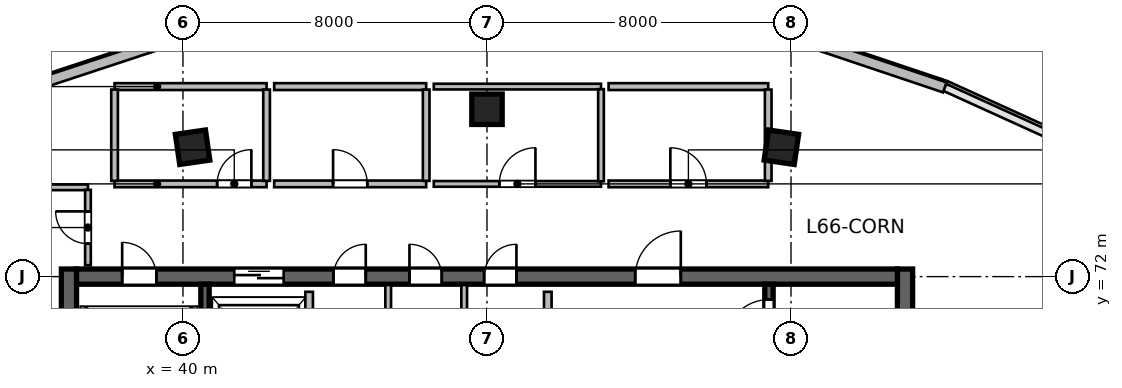
"""IFC4 building model, lengths in metres.
Left out: names, types, materials, properties, quantities, classifications, styles, units other than length and angle.
Written with IfcOpenShell. Run it as: python <this file> out.ifc"""

import sys

from ifc_helpers import new_model, si_unit, direction, frame, frame_2d, origin, origin_2d, place, context, subcontext, project, spatial, rectangle, extrude, source, transform, mapped, element, fill, save


model = new_model("IFC4")
c1 = context("Model", 3, precision=1e-05, world=origin(), true_north=direction((0.0, 1.0)))
c2 = subcontext(c1, "Body", "Model", "MODEL_VIEW")
j1 = project(units=[si_unit("LENGTHUNIT", "METRE"), si_unit("PLANEANGLEUNIT", "RADIAN")], contexts=[c1])
p1 = place(None, origin())
s1 = spatial("IfcSite", under=j1, at=p1, CompositionType="ELEMENT")
p2 = place(p1, origin())
s2 = spatial("IfcBuilding", under=s1, at=p2, CompositionType="ELEMENT")
p3 = place(p2, frame((0.0, 0.0, 271.8)))
s3 = spatial("IfcBuildingStorey", under=s2, at=p3, CompositionType="ELEMENT", Elevation=271.8)
m1 = source(origin(), c2, "Body", "SweptSolid", [
    extrude(rectangle(XDim=12.0, YDim=0.4, at=frame_2d((6.0, 0.0))), origin(), (0.0, 0.0, 1.0), 3.9),
])
for number, where, z_axis, x_axis in (
    (1, (37.0, 60.2, 0.0), (0.0, 0.0, 1.0), (0.0, 1.0, 0.0)),
    (2, (59.0, 60.2, 0.0), (0.0, 0.0, 1.0), (0.0, 1.0, 0.0)),
):
    element("IfcWall", number, at=place(p3, frame(where, z_axis=z_axis, x_axis=x_axis)), inside=s3, PredefinedType="SHEAR", context=c2, shape_type="MappedRepresentation", body=[
        mapped(m1, transform((0.0, 0.0, 0.0), scale=1.0)),
    ])
m2 = source(origin(), c2, "Body", "SweptSolid", [
    extrude(rectangle(XDim=21.6, YDim=0.4, at=frame_2d((10.8, 0.0))), origin(), (0.0, 0.0, 1.0), 3.9),
])
p4 = place(p3, frame((37.2, 72.0, 0.0), z_axis=(0.0, 0.0, 1.0), x_axis=(1.0, 0.0, 0.0)))
e3 = element("IfcWall", 3, at=p4, inside=s3, PredefinedType="SHEAR", context=c2, shape_type="MappedRepresentation", body=[
    mapped(m2, transform((0.0, 0.0, 0.0), scale=1.0)),
])
p5 = place(p4, frame((1.2, 0.0, 0.0)))
e4 = element("IfcOpeningElement", 4, at=p5, cuts=e3, PredefinedType="OPENING", context=c2, shape_type="SweptSolid", body=[
    extrude(rectangle(XDim=0.9, YDim=2.1, at=frame_2d((0.45, 1.05))), frame((0.0, 0.21, 0.0), z_axis=(0.0, -1.0, 0.0), x_axis=(1.0, 0.0, 0.0)), (0.0, 0.0, 1.0), 0.42),
])
p6 = place(p4, frame((14.7, 0.0, 0.0)))
e5 = element("IfcOpeningElement", 5, at=p6, cuts=e3, PredefinedType="OPENING", context=c2, shape_type="SweptSolid", body=[
    extrude(rectangle(XDim=1.2, YDim=2.15, at=frame_2d((0.6, 1.075))), frame((0.0, 0.21, 0.0), z_axis=(0.0, -1.0, 0.0), x_axis=(1.0, 0.0, 0.0)), (0.0, 0.0, 1.0), 0.42),
])
p7 = place(p4, frame((4.15, 0.0, 0.0)))
e6 = element("IfcOpeningElement", 6, at=p7, cuts=e3, PredefinedType="OPENING", context=c2, shape_type="SweptSolid", body=[
    extrude(rectangle(XDim=1.3, YDim=2.15, at=frame_2d((0.65, 1.075))), frame((0.0, 0.21, 0.0), z_axis=(0.0, -1.0, 0.0), x_axis=(1.0, 0.0, 0.0)), (0.0, 0.0, 1.0), 0.42),
])
p8 = place(p4, frame((6.76, 0.0, 0.0)))
e7 = element("IfcOpeningElement", 7, at=p8, cuts=e3, PredefinedType="OPENING", context=c2, shape_type="SweptSolid", body=[
    extrude(rectangle(XDim=0.85, YDim=2.1, at=frame_2d((0.425, 1.05))), frame((0.0, 0.21, 0.0), z_axis=(0.0, -1.0, 0.0), x_axis=(1.0, 0.0, 0.0)), (0.0, 0.0, 1.0), 0.42),
])
p9 = place(p4, frame((8.76, 0.0, 0.0)))
e8 = element("IfcOpeningElement", 8, at=p9, cuts=e3, PredefinedType="OPENING", context=c2, shape_type="SweptSolid", body=[
    extrude(rectangle(XDim=0.85, YDim=2.1, at=frame_2d((0.425, 1.05))), frame((0.0, 0.21, 0.0), z_axis=(0.0, -1.0, 0.0), x_axis=(1.0, 0.0, 0.0)), (0.0, 0.0, 1.0), 0.42),
])
p10 = place(p4, frame((10.725, 0.0, 0.0)))
e9 = element("IfcOpeningElement", 9, at=p10, cuts=e3, PredefinedType="OPENING", context=c2, shape_type="SweptSolid", body=[
    extrude(rectangle(XDim=0.85, YDim=2.1, at=frame_2d((0.425, 1.05))), frame((0.0, 0.21, 0.0), z_axis=(0.0, -1.0, 0.0), x_axis=(1.0, 0.0, 0.0)), (0.0, 0.0, 1.0), 0.42),
])
m3 = source(origin(), c2, "Body", "SweptSolid", [
    extrude(rectangle(XDim=11.2, YDim=0.22, at=frame_2d((5.6, 0.0))), origin(), (0.0, 0.0, 1.0), 3.9),
])
p11 = place(p3, frame((40.58, 60.6, 0.0), z_axis=(0.0, 0.0, 1.0), x_axis=(0.0, 1.0, 0.0)))
e10 = element("IfcWall", 10, at=p11, inside=s3, PredefinedType="SHEAR", context=c2, shape_type="MappedRepresentation", body=[
    mapped(m3, transform((0.0, 0.0, 0.0), scale=1.0)),
])
p12 = place(p3, frame((55.42, 60.6, 0.0), z_axis=(0.0, 0.0, 1.0), x_axis=(0.0, 1.0, 0.0)))
e11 = element("IfcWall", 11, at=p12, inside=s3, PredefinedType="SHEAR", context=c2, shape_type="MappedRepresentation", body=[
    mapped(m3, transform((0.0, 0.0, 0.0), scale=1.0)),
])
p13 = place(p12, frame((9.645, 0.0, 0.0)))
e12 = element("IfcOpeningElement", 12, at=p13, cuts=e11, PredefinedType="OPENING", context=c2, shape_type="SweptSolid", body=[
    extrude(rectangle(XDim=1.15, YDim=2.15, at=frame_2d((0.575, 1.075))), frame((0.0, 0.12, 0.0), z_axis=(0.0, -1.0, 0.0), x_axis=(1.0, 0.0, 0.0)), (0.0, 0.0, 1.0), 0.24),
])
m4 = source(origin(), c2, "Body", "SweptSolid", [
    extrude(rectangle(XDim=0.8, YDim=0.8, at=origin_2d()), origin(), (0.0, 0.0, 1.0), 3.9),
])
for number, where, z_axis, x_axis in (
    (13, (40.253, 75.404, 0.0), (0.0, 0.0, 1.0), (-0.143, 0.99, 0.0)),
    (14, (48.0, 76.404, 0.0), (0.0, 0.0, 1.0), (0.0, 1.0, 0.0)),
    (15, (55.747, 75.404, 0.0), (0.0, 0.0, 1.0), (0.143, 0.99, 0.0)),
):
    element("IfcColumn", number, at=place(p3, frame(where, z_axis=z_axis, x_axis=x_axis)), inside=s3, PredefinedType="COLUMN", context=c2, shape_type="MappedRepresentation", body=[
        mapped(m4, transform((0.0, 0.0, 0.0), scale=1.0)),
    ])
m5 = source(origin(), c2, "Body", "SweptSolid", [
    extrude(rectangle(XDim=3.54, YDim=0.28, at=frame_2d((1.77, 0.0))), origin(), (0.0, 0.0, 1.0), 3.64),
])
p14 = place(p3, frame((36.132, 77.049, 0.0), z_axis=(0.0, 0.0, 1.0), x_axis=(0.949678507031, 0.313226329165, 0.0)))
e16 = element("IfcWall", 16, at=p14, inside=s3, PredefinedType="SOLIDWALL", context=c2, shape_type="MappedRepresentation", body=[
    mapped(m5, transform((0.0, 0.0, 0.0), scale=1.0)),
])
m6 = source(origin(), c2, "Body", "SweptSolid", [
    extrude(rectangle(XDim=3.543, YDim=0.28, at=frame_2d((1.771, 0.0))), origin(), (0.0, 0.0, 1.0), 3.64),
])
p15 = place(p3, frame((56.688, 78.108, 0.0), z_axis=(0.0, 0.0, 1.0), x_axis=(0.947922565312, -0.318500879389, 0.0)))
e17 = element("IfcWall", 17, at=p15, inside=s3, PredefinedType="SOLIDWALL", context=c2, shape_type="MappedRepresentation", body=[
    mapped(m6, transform((0.0, 0.0, 0.0), scale=1.0)),
])
m7 = source(origin(), c2, "Body", "SweptSolid", [
    extrude(rectangle(XDim=5.8, YDim=0.2, at=frame_2d((2.9, 0.0))), origin(), (0.0, 0.0, 1.0), 3.64),
])
p16 = place(p3, frame((49.6, 65.8, 0.0), z_axis=(0.0, 0.0, 1.0), x_axis=(0.0, 1.0, 0.0)))
e18 = element("IfcWall", 18, at=p16, inside=s3, PredefinedType="SOLIDWALL", context=c2, shape_type="MappedRepresentation", body=[
    mapped(m7, transform((0.0, 0.0, 0.0), scale=1.0)),
])
m8 = source(origin(), c2, "Body", "SweptSolid", [
    extrude(rectangle(XDim=3.2, YDim=0.2, at=frame_2d((1.6, 0.0))), origin(), (0.0, 0.0, 1.0), 3.64),
])
p17 = place(p3, frame((43.32, 68.4, 0.0), z_axis=(0.0, 0.0, 1.0), x_axis=(0.0, 1.0, 0.0)))
e19 = element("IfcWall", 19, at=p17, inside=s3, PredefinedType="SOLIDWALL", context=c2, shape_type="MappedRepresentation", body=[
    mapped(m8, transform((0.0, 0.0, 0.0), scale=1.0)),
])
m9 = source(origin(), c2, "Body", "SweptSolid", [
    extrude(rectangle(XDim=3.38, YDim=0.15, at=frame_2d((1.69, 0.0))), origin(), (0.0, 0.0, 1.0), 3.64),
])
for number, where, z_axis, x_axis in (
    (20, (45.4, 68.4, 0.0), (0.0, 0.0, 1.0), (0.0, 1.0, 0.0)),
    (21, (47.4, 68.4, 0.0), (0.0, 0.0, 1.0), (0.0, 1.0, 0.0)),
):
    element("IfcWall", number, at=place(p3, frame(where, z_axis=z_axis, x_axis=x_axis)), inside=s3, PredefinedType="PARTITIONING", context=c2, shape_type="MappedRepresentation", body=[
        mapped(m9, transform((0.0, 0.0, 0.0), scale=1.0)),
    ])
m10 = source(origin(), c2, "Body", "SweptSolid", [
    extrude(rectangle(XDim=3.1, YDim=0.15, at=frame_2d((1.55, 0.0))), origin(), (0.0, 0.0, 1.0), 3.071),
])
p18 = place(p3, frame((34.4, 74.35, 0.0), z_axis=(0.0, 0.0, 1.0), x_axis=(1.0, 0.0, 0.0)))
e22 = element("IfcWall", 22, at=p18, inside=s3, PredefinedType="PARTITIONING", context=c2, shape_type="MappedRepresentation", body=[
    mapped(m10, transform((0.0, 0.0, 0.0), scale=1.0)),
])
m11 = source(origin(), c2, "Body", "SweptSolid", [
    extrude(rectangle(XDim=1.982, YDim=0.15, at=frame_2d((0.991, 0.0))), origin(), (0.0, 0.0, 1.0), 3.64),
])
p19 = place(p3, frame((37.5, 72.3, 0.0), z_axis=(0.0, 0.0, 1.0), x_axis=(0.0, 1.0, 0.0)))
e23 = element("IfcWall", 23, at=p19, inside=s3, PredefinedType="PARTITIONING", context=c2, shape_type="MappedRepresentation", body=[
    mapped(m11, transform((0.0, 0.0, 0.0), scale=1.0)),
])
p20 = place(p19, frame((0.566, 0.0, 0.0)))
e24 = element("IfcOpeningElement", 24, at=p20, cuts=e23, PredefinedType="OPENING", context=c2, shape_type="SweptSolid", body=[
    extrude(rectangle(XDim=0.85, YDim=2.1, at=frame_2d((0.425, 1.05))), frame((0.0, 0.085, 0.0), z_axis=(0.0, -1.0, 0.0), x_axis=(1.0, 0.0, 0.0)), (0.0, 0.0, 1.0), 0.17),
])
m12 = source(origin(), c2, "Body", "SweptSolid", [
    extrude(rectangle(XDim=4.0, YDim=0.175, at=frame_2d((2.0, 0.0))), origin(), (0.0, 0.0, 1.0), 3.64),
])
p21 = place(p3, frame((38.2, 74.44, 0.0), z_axis=(0.0, 0.0, 1.0), x_axis=(1.0, 0.0, 0.0)))
e25 = element("IfcWall", 25, at=p21, inside=s3, PredefinedType="PARTITIONING", context=c2, shape_type="MappedRepresentation", body=[
    mapped(m12, transform((0.0, 0.0, 0.0), scale=1.0)),
])
p22 = place(p21, frame((2.7, 0.0, 0.0)))
e26 = element("IfcOpeningElement", 26, at=p22, cuts=e25, PredefinedType="OPENING", context=c2, shape_type="SweptSolid", body=[
    extrude(rectangle(XDim=0.9, YDim=2.08, at=frame_2d((0.45, 1.04))), frame((0.0, 0.098, 0.0), z_axis=(0.0, -1.0, 0.0), x_axis=(1.0, 0.0, 0.0)), (0.0, 0.0, 1.0), 0.195),
])
m13 = source(origin(), c2, "Body", "SweptSolid", [
    extrude(rectangle(XDim=4.0, YDim=0.18, at=frame_2d((2.0, 0.0))), origin(), (0.0, 0.0, 1.0), 3.64),
])
p23 = place(p3, frame((38.2, 77.0, 0.0), z_axis=(0.0, 0.0, 1.0), x_axis=(1.0, 0.0, 0.0)))
e27 = element("IfcWall", 27, at=p23, inside=s3, PredefinedType="PLUMBINGWALL", context=c2, shape_type="MappedRepresentation", body=[
    mapped(m13, transform((0.0, 0.0, 0.0), scale=1.0)),
])
m14 = source(origin(), c2, "Body", "SweptSolid", [
    extrude(rectangle(XDim=2.403, YDim=0.175, at=frame_2d((1.201, 0.0))), origin(), (0.0, 0.0, 1.0), 3.64),
])
for number, where, z_axis, x_axis in (
    (28, (38.2, 74.519, 0.0), (0.0, 0.0, 1.0), (0.0, 1.0, 0.0)),
    (29, (42.2, 74.519, 0.0), (0.0, 0.0, 1.0), (0.0, 1.0, 0.0)),
):
    element("IfcWall", number, at=place(p3, frame(where, z_axis=z_axis, x_axis=x_axis)), inside=s3, PredefinedType="PARTITIONING", context=c2, shape_type="MappedRepresentation", body=[
        mapped(m14, transform((0.0, 0.0, 0.0), scale=1.0)),
    ])
p24 = place(p3, frame((42.4, 74.44, 0.0), z_axis=(0.0, 0.0, 1.0), x_axis=(1.0, 0.0, 0.0)))
e30 = element("IfcWall", 30, at=p24, inside=s3, PredefinedType="PARTITIONING", context=c2, shape_type="MappedRepresentation", body=[
    mapped(m12, transform((0.0, 0.0, 0.0), scale=1.0)),
])
p25 = place(p24, frame((1.55, 0.0, 0.0)))
e31 = element("IfcOpeningElement", 31, at=p25, cuts=e30, PredefinedType="OPENING", context=c2, shape_type="SweptSolid", body=[
    extrude(rectangle(XDim=0.9, YDim=2.08, at=frame_2d((0.45, 1.04))), frame((0.0, 0.098, 0.0), z_axis=(0.0, -1.0, 0.0), x_axis=(1.0, 0.0, 0.0)), (0.0, 0.0, 1.0), 0.195),
])
p26 = place(p3, frame((42.4, 77.0, 0.0), z_axis=(0.0, 0.0, 1.0), x_axis=(1.0, 0.0, 0.0)))
e32 = element("IfcWall", 32, at=p26, inside=s3, PredefinedType="PLUMBINGWALL", context=c2, shape_type="MappedRepresentation", body=[
    mapped(m13, transform((0.0, 0.0, 0.0), scale=1.0)),
])
p27 = place(p3, frame((46.4, 74.519, 0.0), z_axis=(0.0, 0.0, 1.0), x_axis=(0.0, 1.0, 0.0)))
e33 = element("IfcWall", 33, at=p27, inside=s3, PredefinedType="PARTITIONING", context=c2, shape_type="MappedRepresentation", body=[
    mapped(m14, transform((0.0, 0.0, 0.0), scale=1.0)),
])
m15 = source(origin(), c2, "Body", "SweptSolid", [
    extrude(rectangle(XDim=4.4, YDim=0.15, at=frame_2d((2.2, 0.0))), origin(), (0.0, 0.0, 1.0), 3.64),
])
p28 = place(p3, frame((46.6, 74.44, 0.0), z_axis=(0.0, 0.0, 1.0), x_axis=(1.0, 0.0, 0.0)))
e34 = element("IfcWall", 34, at=p28, inside=s3, PredefinedType="PARTITIONING", context=c2, shape_type="MappedRepresentation", body=[
    mapped(m15, transform((0.0, 0.0, 0.0), scale=1.0)),
])
p29 = place(p28, frame((1.725, 0.0, 0.0)))
e35 = element("IfcOpeningElement", 35, at=p29, cuts=e34, PredefinedType="OPENING", context=c2, shape_type="SweptSolid", body=[
    extrude(rectangle(XDim=0.95, YDim=2.1, at=frame_2d((0.475, 1.05))), frame((0.0, 0.085, 0.0), z_axis=(0.0, -1.0, 0.0), x_axis=(1.0, 0.0, 0.0)), (0.0, 0.0, 1.0), 0.17),
])
p30 = place(p3, frame((46.6, 77.0, 0.0), z_axis=(0.0, 0.0, 1.0), x_axis=(1.0, 0.0, 0.0)))
e36 = element("IfcWall", 36, at=p30, inside=s3, PredefinedType="PARTITIONING", context=c2, shape_type="MappedRepresentation", body=[
    mapped(m15, transform((0.0, 0.0, 0.0), scale=1.0)),
])
m16 = source(origin(), c2, "Body", "SweptSolid", [
    extrude(rectangle(XDim=2.425, YDim=0.15, at=frame_2d((1.212, 0.0))), origin(), (0.0, 0.0, 1.0), 3.64),
])
p31 = place(p3, frame((51.0, 74.508, 0.0), z_axis=(0.0, 0.0, 1.0), x_axis=(0.0, 1.0, 0.0)))
e37 = element("IfcWall", 37, at=p31, inside=s3, PredefinedType="PARTITIONING", context=c2, shape_type="MappedRepresentation", body=[
    mapped(m16, transform((0.0, 0.0, 0.0), scale=1.0)),
])
m17 = source(origin(), c2, "Body", "SweptSolid", [
    extrude(rectangle(XDim=4.2, YDim=0.175, at=frame_2d((2.1, 0.0))), origin(), (0.0, 0.0, 1.0), 3.64),
])
p32 = place(p3, frame((51.2, 74.44, 0.0), z_axis=(0.0, 0.0, 1.0), x_axis=(1.0, 0.0, 0.0)))
e38 = element("IfcWall", 38, at=p32, inside=s3, PredefinedType="PARTITIONING", context=c2, shape_type="MappedRepresentation", body=[
    mapped(m17, transform((0.0, 0.0, 0.0), scale=1.0)),
])
p33 = place(p32, frame((1.625, 0.0, 0.0)))
e39 = element("IfcOpeningElement", 39, at=p33, cuts=e38, PredefinedType="OPENING", context=c2, shape_type="SweptSolid", body=[
    extrude(rectangle(XDim=0.95, YDim=2.12, at=frame_2d((0.475, 1.06))), frame((0.0, 0.098, 0.0), z_axis=(0.0, -1.0, 0.0), x_axis=(1.0, 0.0, 0.0)), (0.0, 0.0, 1.0), 0.195),
])
m18 = source(origin(), c2, "Body", "SweptSolid", [
    extrude(rectangle(XDim=4.2, YDim=0.18, at=frame_2d((2.1, 0.0))), origin(), (0.0, 0.0, 1.0), 3.64),
])
p34 = place(p3, frame((51.2, 77.0, 0.0), z_axis=(0.0, 0.0, 1.0), x_axis=(1.0, 0.0, 0.0)))
e40 = element("IfcWall", 40, at=p34, inside=s3, PredefinedType="PLUMBINGWALL", context=c2, shape_type="MappedRepresentation", body=[
    mapped(m18, transform((0.0, 0.0, 0.0), scale=1.0)),
])
p35 = place(p3, frame((55.4, 74.519, 0.0), z_axis=(0.0, 0.0, 1.0), x_axis=(0.0, 1.0, 0.0)))
e41 = element("IfcWall", 41, at=p35, inside=s3, PredefinedType="PARTITIONING", context=c2, shape_type="MappedRepresentation", body=[
    mapped(m14, transform((0.0, 0.0, 0.0), scale=1.0)),
])
m19 = source(origin(), c2, "Body", "SweptSolid", [
    extrude(rectangle(XDim=12.909, YDim=0.15, at=frame_2d((6.454, 0.0))), origin(), (0.0, 0.0, 1.0), 3.64),
])
p36 = place(p3, frame((36.5, 63.216, 0.0), z_axis=(0.0, 0.0, 1.0), x_axis=(-0.268750817191, 0.963209737419, 0.0)))
e42 = element("IfcWall", 42, at=p36, inside=s3, PredefinedType="PARTITIONING", context=c2, shape_type="MappedRepresentation", body=[
    mapped(m19, transform((0.0, 0.0, 0.0), scale=1.0)),
])
m20 = source(origin(), c2, "Body", "SweptSolid", [
    extrude(rectangle(XDim=0.9, YDim=2.1, at=frame_2d((0.45, 1.05))), frame((0.0, 0.025, 0.0), z_axis=(0.0, -1.0, 0.0), x_axis=(1.0, 0.0, 0.0)), (0.0, 0.0, 1.0), 0.05),
])
p37 = place(p5, origin())
e43 = element("IfcDoor", 43, at=p37, inside=s3, OperationType="SINGLE_SWING_LEFT", PredefinedType="DOOR", context=c2, shape_type="MappedRepresentation", body=[
    mapped(m20, transform((0.0, 0.0, 0.0), scale=1.0)),
])
fill(e4, e43)
m21 = source(origin(), c2, "Body", "SweptSolid", [
    extrude(rectangle(XDim=1.15, YDim=2.15, at=frame_2d((0.575, 1.075))), frame((0.0, 0.025, 0.0), z_axis=(0.0, -1.0, 0.0), x_axis=(1.0, 0.0, 0.0)), (0.0, 0.0, 1.0), 0.05),
])
p38 = place(p13, origin())
e44 = element("IfcDoor", 44, at=p38, inside=s3, OperationType="SINGLE_SWING_LEFT", PredefinedType="DOOR", context=c2, shape_type="MappedRepresentation", body=[
    mapped(m21, transform((0.0, 0.0, 0.0), scale=1.0)),
])
fill(e12, e44)
m22 = source(origin(), c2, "Body", "SweptSolid", [
    extrude(rectangle(XDim=1.2, YDim=2.15, at=frame_2d((0.6, 1.075))), frame((0.0, 0.025, 0.0), z_axis=(0.0, -1.0, 0.0), x_axis=(1.0, 0.0, 0.0)), (0.0, 0.0, 1.0), 0.05),
])
p39 = place(p6, origin())
e45 = element("IfcDoor", 45, at=p39, inside=s3, OperationType="SINGLE_SWING_RIGHT", PredefinedType="DOOR", context=c2, shape_type="MappedRepresentation", body=[
    mapped(m22, transform((0.0, 0.0, 0.0), scale=1.0)),
])
fill(e5, e45)
m23 = source(origin(), c2, "Body", "SweptSolid", [
    extrude(rectangle(XDim=1.3, YDim=2.15, at=frame_2d((0.65, 1.075))), frame((0.0, 0.025, 0.0), z_axis=(0.0, -1.0, 0.0), x_axis=(1.0, 0.0, 0.0)), (0.0, 0.0, 1.0), 0.05),
])
p40 = place(p7, origin())
e46 = element("IfcDoor", 46, at=p40, inside=s3, OperationType="DOUBLE_DOOR_SLIDING", PredefinedType="DOOR", context=c2, shape_type="MappedRepresentation", body=[
    mapped(m23, transform((0.0, 0.0, 0.0), scale=1.0)),
])
fill(e6, e46)
m24 = source(origin(), c2, "Body", "SweptSolid", [
    extrude(rectangle(XDim=0.85, YDim=2.1, at=frame_2d((0.425, 1.05))), frame((0.0, 0.025, 0.0), z_axis=(0.0, -1.0, 0.0), x_axis=(1.0, 0.0, 0.0)), (0.0, 0.0, 1.0), 0.05),
])
p41 = place(p8, origin())
e47 = element("IfcDoor", 47, at=p41, inside=s3, OperationType="SINGLE_SWING_RIGHT", PredefinedType="DOOR", context=c2, shape_type="MappedRepresentation", body=[
    mapped(m24, transform((0.0, 0.0, 0.0), scale=1.0)),
])
fill(e7, e47)
p42 = place(p9, origin())
e48 = element("IfcDoor", 48, at=p42, inside=s3, OperationType="SINGLE_SWING_LEFT", PredefinedType="DOOR", context=c2, shape_type="MappedRepresentation", body=[
    mapped(m24, transform((0.0, 0.0, 0.0), scale=1.0)),
])
fill(e8, e48)
p43 = place(p10, origin())
e49 = element("IfcDoor", 49, at=p43, inside=s3, OperationType="SINGLE_SWING_RIGHT", PredefinedType="DOOR", context=c2, shape_type="MappedRepresentation", body=[
    mapped(m24, transform((0.0, 0.0, 0.0), scale=1.0)),
])
fill(e9, e49)
p44 = place(p20, origin())
e50 = element("IfcDoor", 50, at=p44, inside=s3, OperationType="SINGLE_SWING_RIGHT", PredefinedType="DOOR", context=c2, shape_type="MappedRepresentation", body=[
    mapped(m24, transform((0.0, 0.0, 0.0), scale=1.0)),
])
fill(e24, e50)
m25 = source(origin(), c2, "Body", "SweptSolid", [
    extrude(rectangle(XDim=0.9, YDim=2.08, at=frame_2d((0.45, 1.04))), frame((0.0, 0.025, 0.0), z_axis=(0.0, -1.0, 0.0), x_axis=(1.0, 0.0, 0.0)), (0.0, 0.0, 1.0), 0.05),
])
p45 = place(p22, origin())
e51 = element("IfcDoor", 51, at=p45, inside=s3, OperationType="SINGLE_SWING_RIGHT", PredefinedType="DOOR", context=c2, shape_type="MappedRepresentation", body=[
    mapped(m25, transform((0.0, 0.0, 0.0), scale=1.0)),
])
fill(e26, e51)
p46 = place(p25, origin())
e52 = element("IfcDoor", 52, at=p46, inside=s3, OperationType="SINGLE_SWING_LEFT", PredefinedType="DOOR", context=c2, shape_type="MappedRepresentation", body=[
    mapped(m25, transform((0.0, 0.0, 0.0), scale=1.0)),
])
fill(e31, e52)
m26 = source(origin(), c2, "Body", "SweptSolid", [
    extrude(rectangle(XDim=0.95, YDim=2.1, at=frame_2d((0.475, 1.05))), frame((0.0, 0.025, 0.0), z_axis=(0.0, -1.0, 0.0), x_axis=(1.0, 0.0, 0.0)), (0.0, 0.0, 1.0), 0.05),
])
p47 = place(p29, origin())
e53 = element("IfcDoor", 53, at=p47, inside=s3, OperationType="SINGLE_SWING_RIGHT", PredefinedType="DOOR", context=c2, shape_type="MappedRepresentation", body=[
    mapped(m26, transform((0.0, 0.0, 0.0), scale=1.0)),
])
fill(e35, e53)
m27 = source(origin(), c2, "Body", "SweptSolid", [
    extrude(rectangle(XDim=0.95, YDim=2.12, at=frame_2d((0.475, 1.06))), frame((0.0, 0.025, 0.0), z_axis=(0.0, -1.0, 0.0), x_axis=(1.0, 0.0, 0.0)), (0.0, 0.0, 1.0), 0.05),
])
p48 = place(p33, origin())
e54 = element("IfcDoor", 54, at=p48, inside=s3, OperationType="SINGLE_SWING_LEFT", PredefinedType="DOOR", context=c2, shape_type="MappedRepresentation", body=[
    mapped(m27, transform((0.0, 0.0, 0.0), scale=1.0)),
])
fill(e39, e54)
save(model, sys.argv[1])
